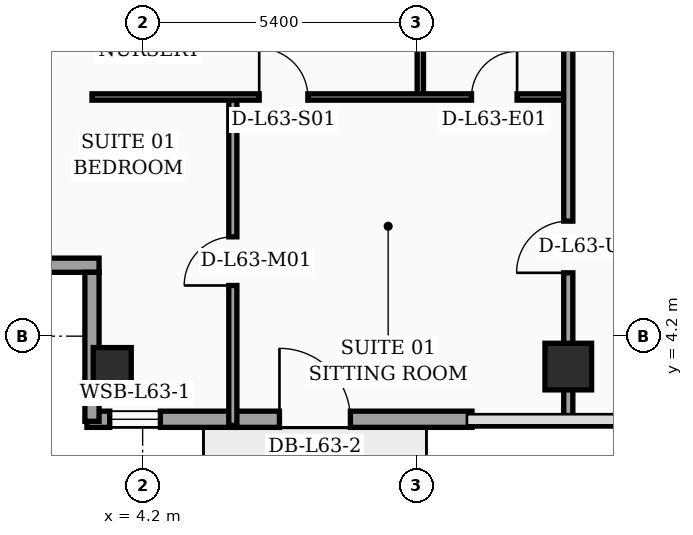
"""IFC4 building model, lengths in metres.
Left out: names, types, materials, properties, quantities, classifications, styles, units other than length and angle.
Written with IfcOpenShell. Run it as: python <this file> out.ifc"""

import sys

from ifc_helpers import new_model, si_unit, direction, frame, frame_2d, origin, origin_2d, place, context, subcontext, project, spatial, rectangle, hollow_rectangle, extrude, element, fill, save


model = new_model("IFC4")
c1 = context("Model", 3, precision=1e-05, world=origin(), true_north=direction((0.0, 1.0)))
c2 = subcontext(c1, "Body", "Model", "MODEL_VIEW")
j1 = project(units=[si_unit("LENGTHUNIT", "METRE"), si_unit("PLANEANGLEUNIT", "RADIAN")], contexts=[c1])
p1 = place(None, origin())
s1 = spatial("IfcSite", under=j1, at=p1, CompositionType="ELEMENT")
p2 = place(p1, origin())
s2 = spatial("IfcBuilding", under=s1, at=p2, CompositionType="ELEMENT")
p3 = place(p2, frame((0.0, 0.0, 255.2)))
s3 = spatial("IfcBuildingStorey", under=s2, at=p3, CompositionType="ELEMENT", Elevation=255.2)
p4 = place(p3, frame((3.6, 3.6, 0.0), z_axis=(0.0, 0.0, 1.0), x_axis=(1.0, 0.0, 0.0)))
e1 = element("IfcColumn", 1, at=p4, inside=s3, PredefinedType="COLUMN", context=c2, shape_type="SweptSolid", body=[
    extrude(hollow_rectangle(XDim=0.75, YDim=0.75, WallThickness=0.032, at=origin_2d()), origin(), (0.0, 0.0, 1.0), 3.56),
])
p5 = place(p3, frame((12.6, 3.6, 0.0), z_axis=(0.0, 0.0, 1.0), x_axis=(1.0, 0.0, 0.0)))
e2 = element("IfcColumn", 2, at=p5, inside=s3, PredefinedType="COLUMN", context=c2, shape_type="SweptSolid", body=[
    extrude(rectangle(XDim=0.92, YDim=0.92, at=origin_2d()), origin(), (0.0, 0.0, 1.0), 3.56),
])
p6 = place(p3, frame((3.1, 2.56, 0.0), z_axis=(0.0, 0.0, 1.0), x_axis=(1.0, 0.0, 0.0)))
e3 = element("IfcWall", 3, at=p6, inside=s3, PredefinedType="SOLIDWALL", context=c2, shape_type="SweptSolid", body=[
    extrude(rectangle(XDim=7.6, YDim=0.32, at=frame_2d((3.8, 0.0))), origin(), (0.0, 0.0, 1.0), 3.56),
])
p7 = place(p6, frame((0.45, 0.0, 0.75)))
e4 = element("IfcOpeningElement", 4, at=p7, cuts=e3, PredefinedType="OPENING", context=c2, shape_type="SweptSolid", body=[
    extrude(rectangle(XDim=1.0, YDim=1.6, at=frame_2d((0.5, 0.8))), frame((0.0, 0.17, 0.0), z_axis=(0.0, -1.0, 0.0), x_axis=(1.0, 0.0, 0.0)), (0.0, 0.0, 1.0), 0.34),
])
p8 = place(p6, frame((3.8, 0.0, 0.0)))
e5 = element("IfcOpeningElement", 5, at=p8, cuts=e3, PredefinedType="OPENING", context=c2, shape_type="SweptSolid", body=[
    extrude(rectangle(XDim=1.4, YDim=2.25, at=frame_2d((0.7, 1.125))), frame((0.0, 0.17, 0.0), z_axis=(0.0, -1.0, 0.0), x_axis=(1.0, 0.0, 0.0)), (0.0, 0.0, 1.0), 0.34),
])
p9 = place(p3, frame((0.12, 5.6, 0.0), z_axis=(0.0, 0.0, 1.0), x_axis=(1.0, 0.0, 0.0)))
e6 = element("IfcWall", 6, at=p9, inside=s3, PredefinedType="SOLIDWALL", context=c2, shape_type="SweptSolid", body=[
    extrude(rectangle(XDim=3.22, YDim=0.28, at=frame_2d((1.61, 0.0))), origin(), (0.0, 0.0, 1.0), 2.99),
])
p10 = place(p3, frame((3.2, 5.46, 0.0), z_axis=(0.0, 0.0, 1.0), x_axis=(0.0, -1.0, 0.0)))
e7 = element("IfcWall", 7, at=p10, inside=s3, PredefinedType="SOLIDWALL", context=c2, shape_type="SweptSolid", body=[
    extrude(rectangle(XDim=2.94, YDim=0.28, at=frame_2d((1.47, 0.0))), origin(), (0.0, 0.0, 1.0), 2.99),
])
p11 = place(p3, frame((9.68, 8.92, 0.0), z_axis=(0.0, 0.0, 1.0), x_axis=(0.0, 1.0, 0.0)))
e8 = element("IfcWall", 8, at=p11, inside=s3, PredefinedType="PARTITIONING", context=c2, shape_type="SweptSolid", body=[
    extrude(rectangle(XDim=2.13, YDim=0.125, at=frame_2d((1.065, 0.0))), origin(), (0.0, 0.0, 1.0), 3.09),
])
p12 = place(p3, frame((5.98, 2.44, 0.0), z_axis=(0.0, 0.0, 1.0), x_axis=(0.0, 1.0, 0.0)))
e9 = element("IfcWall", 9, at=p12, inside=s3, PredefinedType="PARTITIONING", context=c2, shape_type="SweptSolid", body=[
    extrude(rectangle(XDim=6.48, YDim=0.16, at=frame_2d((3.24, 0.0))), origin(), (0.0, 0.0, 1.0), 3.09),
])
p13 = place(p12, frame((2.76, 0.0, 0.0)))
e10 = element("IfcOpeningElement", 10, at=p13, cuts=e9, PredefinedType="OPENING", context=c2, shape_type="SweptSolid", body=[
    extrude(rectangle(XDim=0.96, YDim=2.2, at=frame_2d((0.48, 1.1))), frame((0.0, 0.09, 0.0), z_axis=(0.0, -1.0, 0.0), x_axis=(1.0, 0.0, 0.0)), (0.0, 0.0, 1.0), 0.18),
])
p14 = place(p3, frame((3.2, 8.92, 0.0), z_axis=(0.0, 0.0, 1.0), x_axis=(1.0, 0.0, 0.0)))
e11 = element("IfcWall", 11, at=p14, inside=s3, PredefinedType="PARTITIONING", context=c2, shape_type="SweptSolid", body=[
    extrude(rectangle(XDim=9.4, YDim=0.125, at=frame_2d((4.7, 0.0))), origin(), (0.0, 0.0, 1.0), 2.99),
])
p15 = place(p14, frame((3.3, 0.0, 0.0)))
e12 = element("IfcOpeningElement", 12, at=p15, cuts=e11, PredefinedType="OPENING", context=c2, shape_type="SweptSolid", body=[
    extrude(rectangle(XDim=0.96, YDim=2.2, at=frame_2d((0.48, 1.1))), frame((0.0, 0.073, 0.0), z_axis=(0.0, -1.0, 0.0), x_axis=(1.0, 0.0, 0.0)), (0.0, 0.0, 1.0), 0.145),
])
p16 = place(p14, frame((7.49, 0.0, 0.0)))
e13 = element("IfcOpeningElement", 13, at=p16, cuts=e11, PredefinedType="OPENING", context=c2, shape_type="SweptSolid", body=[
    extrude(rectangle(XDim=0.9, YDim=2.15, at=frame_2d((0.45, 1.075))), frame((0.0, 0.073, 0.0), z_axis=(0.0, -1.0, 0.0), x_axis=(1.0, 0.0, 0.0)), (0.0, 0.0, 1.0), 0.145),
])
p17 = place(p3, frame((12.6, 2.44, 0.0), z_axis=(0.0, 0.0, 1.0), x_axis=(0.0, 1.0, 0.0)))
e14 = element("IfcWall", 14, at=p17, inside=s3, PredefinedType="PARTITIONING", context=c2, shape_type="SweptSolid", body=[
    extrude(rectangle(XDim=14.36, YDim=0.18, at=frame_2d((7.18, 0.0))), origin(), (0.0, 0.0, 1.0), 2.99),
])
p18 = place(p17, frame((3.01, 0.0, 0.0)))
e15 = element("IfcOpeningElement", 15, at=p18, cuts=e14, PredefinedType="OPENING", context=c2, shape_type="SweptSolid", body=[
    extrude(rectangle(XDim=1.02, YDim=2.2, at=frame_2d((0.51, 1.1))), frame((0.0, 0.1, 0.0), z_axis=(0.0, -1.0, 0.0), x_axis=(1.0, 0.0, 0.0)), (0.0, 0.0, 1.0), 0.2),
])
p19 = place(p17, frame((9.95, 0.0, 0.0)))
e16 = element("IfcOpeningElement", 16, at=p19, cuts=e14, PredefinedType="OPENING", context=c2, shape_type="SweptSolid", body=[
    extrude(rectangle(XDim=1.02, YDim=2.2, at=frame_2d((0.51, 1.1))), frame((0.0, 0.1, 0.0), z_axis=(0.0, -1.0, 0.0), x_axis=(1.0, 0.0, 0.0)), (0.0, 0.0, 1.0), 0.2),
])
p20 = place(p7, origin())
e17 = element("IfcWindow", 17, at=p20, inside=s3, PartitioningType="SINGLE_PANEL", PredefinedType="WINDOW", context=c2, shape_type="SweptSolid", body=[
    extrude(rectangle(XDim=1.0, YDim=1.6, at=frame_2d((0.5, 0.8))), frame((0.0, 0.03, 0.0), z_axis=(0.0, -1.0, 0.0), x_axis=(1.0, 0.0, 0.0)), (0.0, 0.0, 1.0), 0.06),
])
fill(e4, e17)
p21 = place(p8, origin())
e18 = element("IfcDoor", 18, at=p21, inside=s3, OperationType="SINGLE_SWING_LEFT", PredefinedType="DOOR", context=c2, shape_type="SweptSolid", body=[
    extrude(rectangle(XDim=1.4, YDim=2.25, at=frame_2d((0.7, 1.125))), frame((0.0, 0.025, 0.0), z_axis=(0.0, -1.0, 0.0), x_axis=(1.0, 0.0, 0.0)), (0.0, 0.0, 1.0), 0.05),
])
fill(e5, e18)
p22 = place(p13, origin())
e19 = element("IfcDoor", 19, at=p22, inside=s3, OperationType="SINGLE_SWING_LEFT", PredefinedType="DOOR", context=c2, shape_type="SweptSolid", body=[
    extrude(rectangle(XDim=0.96, YDim=2.2, at=frame_2d((0.48, 1.1))), frame((0.0, 0.025, 0.0), z_axis=(0.0, -1.0, 0.0), x_axis=(1.0, 0.0, 0.0)), (0.0, 0.0, 1.0), 0.05),
])
fill(e10, e19)
p23 = place(p15, origin())
e20 = element("IfcDoor", 20, at=p23, inside=s3, OperationType="SINGLE_SWING_LEFT", PredefinedType="DOOR", context=c2, shape_type="SweptSolid", body=[
    extrude(rectangle(XDim=0.96, YDim=2.2, at=frame_2d((0.48, 1.1))), frame((0.0, 0.025, 0.0), z_axis=(0.0, -1.0, 0.0), x_axis=(1.0, 0.0, 0.0)), (0.0, 0.0, 1.0), 0.05),
])
fill(e12, e20)
p24 = place(p16, origin())
e21 = element("IfcDoor", 21, at=p24, inside=s3, OperationType="SINGLE_SWING_RIGHT", PredefinedType="DOOR", context=c2, shape_type="SweptSolid", body=[
    extrude(rectangle(XDim=0.9, YDim=2.15, at=frame_2d((0.45, 1.075))), frame((0.0, 0.025, 0.0), z_axis=(0.0, -1.0, 0.0), x_axis=(1.0, 0.0, 0.0)), (0.0, 0.0, 1.0), 0.05),
])
fill(e13, e21)
p25 = place(p18, origin())
e22 = element("IfcDoor", 22, at=p25, inside=s3, OperationType="SINGLE_SWING_LEFT", PredefinedType="DOOR", context=c2, shape_type="SweptSolid", body=[
    extrude(rectangle(XDim=1.02, YDim=2.2, at=frame_2d((0.51, 1.1))), frame((0.0, 0.025, 0.0), z_axis=(0.0, -1.0, 0.0), x_axis=(1.0, 0.0, 0.0)), (0.0, 0.0, 1.0), 0.05),
])
fill(e15, e22)
save(model, sys.argv[1])
